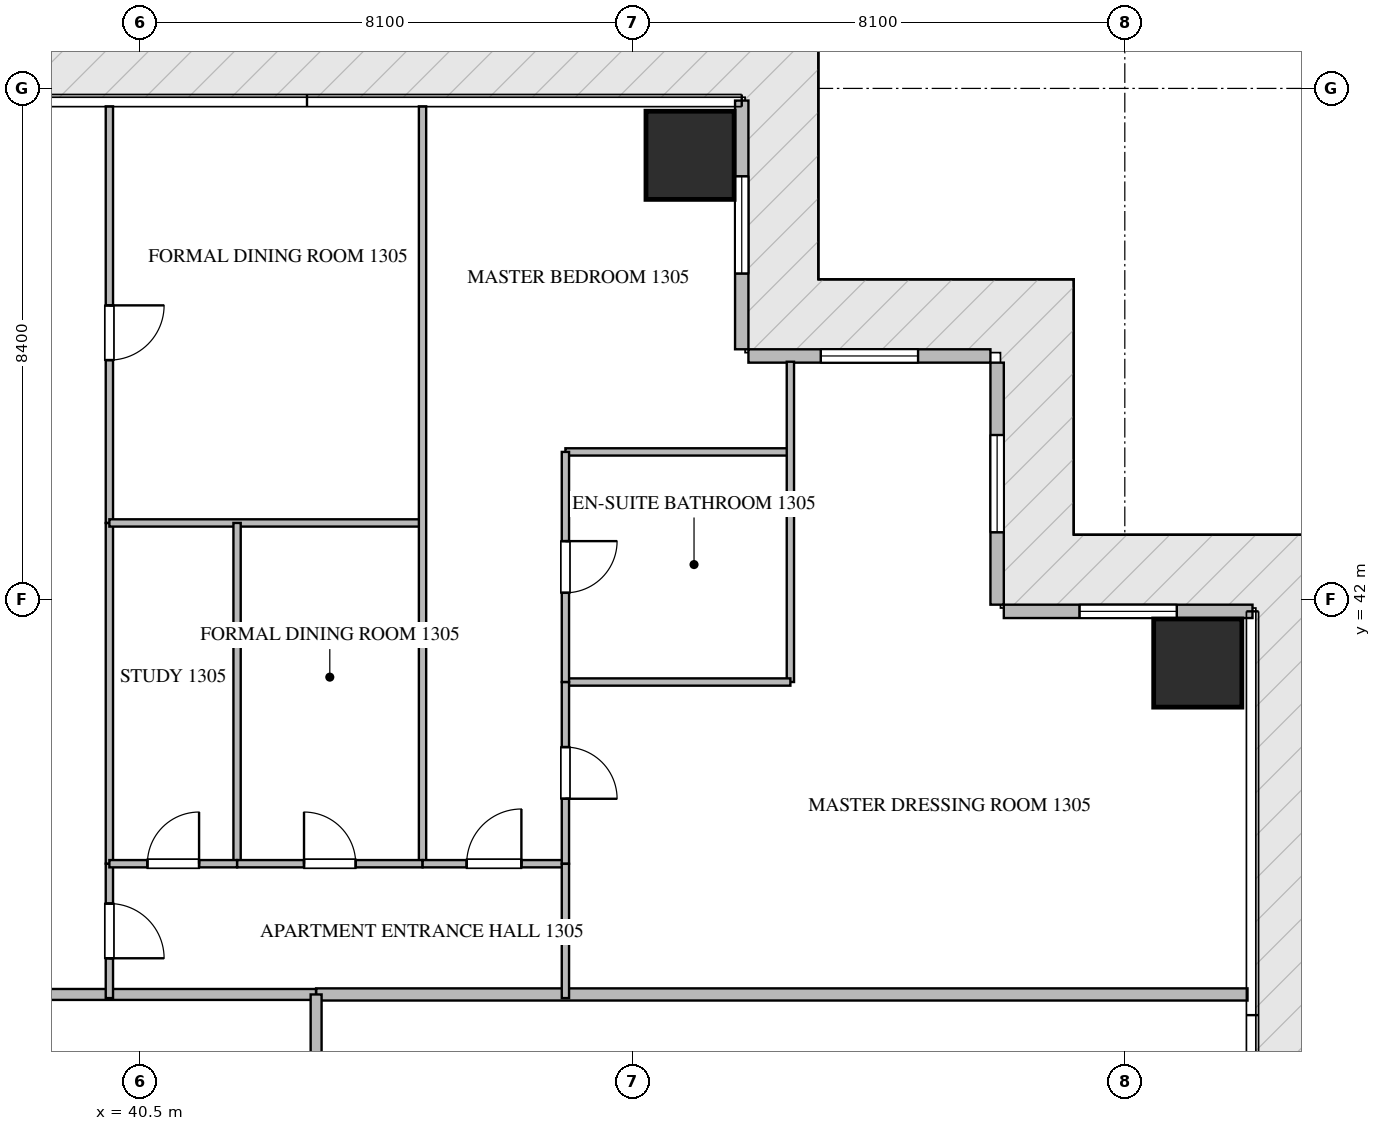
"""IFC4 building model, lengths in metres.
Left out: names, types, materials, properties, quantities, classifications, styles, units other than length and angle.
Written with IfcOpenShell. Run it as: python <this file> out.ifc"""

import sys

from ifc_helpers import new_model, si_unit, direction, frame, frame_2d, origin, origin_2d, place, context, subcontext, project, spatial, rectangle, extrude, source, transform, mapped, element, fill, save


model = new_model("IFC4")
c1 = context("Model", 3, precision=1e-05, world=origin(), true_north=direction((0.0, 1.0)))
c2 = subcontext(c1, "Body", "Model", "MODEL_VIEW")
j1 = project(units=[si_unit("LENGTHUNIT", "METRE"), si_unit("PLANEANGLEUNIT", "RADIAN")], contexts=[c1])
p1 = place(None, origin())
s1 = spatial("IfcSite", under=j1, at=p1, CompositionType="ELEMENT")
p2 = place(p1, origin())
s2 = spatial("IfcBuilding", under=s1, at=p2, CompositionType="ELEMENT")
p3 = place(p2, frame((0.0, 0.0, 56.7)))
s3 = spatial("IfcBuildingStorey", under=s2, at=p3, CompositionType="ELEMENT", Elevation=56.7)
m1 = source(origin(), c2, "Body", "SweptSolid", [
    extrude(rectangle(XDim=1.45, YDim=1.45, at=origin_2d()), origin(), (0.0, 0.0, 1.0), 3.75),
])
for number, where, z_axis, x_axis in (
    (1, (49.55, 49.3, -0.26), (0.0, 0.0, 1.0), (1.0, 0.0, 0.0)),
    (2, (57.9, 40.95, -0.26), (0.0, 0.0, 1.0), (1.0, 0.0, 0.0)),
):
    element("IfcColumn", number, at=place(p3, frame(where, z_axis=z_axis, x_axis=x_axis)), inside=s3, PredefinedType="COLUMN", context=c2, shape_type="MappedRepresentation", body=[
        mapped(m1, transform((0.0, 0.0, 0.0), scale=1.0)),
    ])
p4 = place(p3, frame((58.8, 41.8, 0.0), z_axis=(0.0, 0.0, 1.0), x_axis=(-1.0, 0.0, 0.0)))
e3 = element("IfcWall", 3, at=p4, inside=s3, PredefinedType="ELEMENTEDWALL", context=c2, shape_type="SweptSolid", body=[
    extrude(rectangle(XDim=4.09, YDim=0.22, at=frame_2d((2.045, 0.0))), origin(), (0.0, 0.0, 1.0), 3.475),
])
p5 = place(p4, frame((1.245, 0.0, 0.65)))
e4 = element("IfcOpeningElement", 4, at=p5, cuts=e3, PredefinedType="OPENING", context=c2, shape_type="SweptSolid", body=[
    extrude(rectangle(XDim=1.6, YDim=2.1, at=frame_2d((0.8, 1.05))), frame((0.0, 0.12, 0.0), z_axis=(0.0, -1.0, 0.0), x_axis=(1.0, 0.0, 0.0)), (0.0, 0.0, 1.0), 0.24),
])
p6 = place(p3, frame((54.6, 41.91, 0.0), z_axis=(0.0, 0.0, 1.0), x_axis=(0.0, 1.0, 0.0)))
e5 = element("IfcWall", 5, at=p6, inside=s3, PredefinedType="ELEMENTEDWALL", context=c2, shape_type="SweptSolid", body=[
    extrude(rectangle(XDim=3.98, YDim=0.22, at=frame_2d((1.99, 0.0))), origin(), (0.0, 0.0, 1.0), 3.475),
])
p7 = place(p6, frame((1.19, 0.0, 0.65)))
e6 = element("IfcOpeningElement", 6, at=p7, cuts=e5, PredefinedType="OPENING", context=c2, shape_type="SweptSolid", body=[
    extrude(rectangle(XDim=1.6, YDim=2.1, at=frame_2d((0.8, 1.05))), frame((0.0, 0.12, 0.0), z_axis=(0.0, -1.0, 0.0), x_axis=(1.0, 0.0, 0.0)), (0.0, 0.0, 1.0), 0.24),
])
p8 = place(p3, frame((54.49, 46.0, 0.0), z_axis=(0.0, 0.0, 1.0), x_axis=(-1.0, 0.0, 0.0)))
e7 = element("IfcWall", 7, at=p8, inside=s3, PredefinedType="ELEMENTEDWALL", context=c2, shape_type="SweptSolid", body=[
    extrude(rectangle(XDim=3.98, YDim=0.22, at=frame_2d((1.99, 0.0))), origin(), (0.0, 0.0, 1.0), 3.475),
])
p9 = place(p8, frame((1.19, 0.0, 0.65)))
e8 = element("IfcOpeningElement", 8, at=p9, cuts=e7, PredefinedType="OPENING", context=c2, shape_type="SweptSolid", body=[
    extrude(rectangle(XDim=1.6, YDim=2.1, at=frame_2d((0.8, 1.05))), frame((0.0, 0.12, 0.0), z_axis=(0.0, -1.0, 0.0), x_axis=(1.0, 0.0, 0.0)), (0.0, 0.0, 1.0), 0.24),
])
p10 = place(p3, frame((50.4, 46.11, 0.0), z_axis=(0.0, 0.0, 1.0), x_axis=(0.0, 1.0, 0.0)))
e9 = element("IfcWall", 9, at=p10, inside=s3, PredefinedType="ELEMENTEDWALL", context=c2, shape_type="SweptSolid", body=[
    extrude(rectangle(XDim=4.09, YDim=0.22, at=frame_2d((2.045, 0.0))), origin(), (0.0, 0.0, 1.0), 3.475),
])
p11 = place(p10, frame((1.245, 0.0, 0.65)))
e10 = element("IfcOpeningElement", 10, at=p11, cuts=e9, PredefinedType="OPENING", context=c2, shape_type="SweptSolid", body=[
    extrude(rectangle(XDim=1.6, YDim=2.1, at=frame_2d((0.8, 1.05))), frame((0.0, 0.12, 0.0), z_axis=(0.0, -1.0, 0.0), x_axis=(1.0, 0.0, 0.0)), (0.0, 0.0, 1.0), 0.24),
])
p12 = place(p3, frame((43.4, 35.5, 0.0), z_axis=(0.0, 0.0, 1.0), x_axis=(1.0, 0.0, 0.0)))
e11 = element("IfcWall", 11, at=p12, inside=s3, PredefinedType="PARTITIONING", context=c2, shape_type="SweptSolid", body=[
    extrude(rectangle(XDim=15.318, YDim=0.2, at=frame_2d((7.659, 0.0))), origin(), (0.0, 0.0, 1.0), 3.49),
])
p13 = place(p3, frame((21.402, 35.5, 0.0), z_axis=(0.0, 0.0, 1.0), x_axis=(1.0, 0.0, 0.0)))
e12 = element("IfcWall", 12, at=p13, inside=s3, PredefinedType="PARTITIONING", context=c2, shape_type="SweptSolid", body=[
    extrude(rectangle(XDim=21.996, YDim=0.18, at=frame_2d((10.998, 0.0))), origin(), (0.0, 0.0, 1.0), 3.49),
])
p14 = place(p13, frame((15.222, 0.0, 0.0)))
e13 = element("IfcOpeningElement", 13, at=p14, cuts=e12, PredefinedType="OPENING", context=c2, shape_type="SweptSolid", body=[
    extrude(rectangle(XDim=1.0, YDim=2.15, at=frame_2d((0.5, 1.075))), frame((0.0, 0.1, 0.0), z_axis=(0.0, -1.0, 0.0), x_axis=(1.0, 0.0, 0.0)), (0.0, 0.0, 1.0), 0.2),
])
p15 = place(p3, frame((43.4, 14.9, 0.0), z_axis=(0.0, 0.0, 1.0), x_axis=(0.0, 1.0, 0.0)))
e14 = element("IfcWall", 14, at=p15, inside=s3, PredefinedType="PARTITIONING", context=c2, shape_type="SweptSolid", body=[
    extrude(rectangle(XDim=20.6, YDim=0.18, at=frame_2d((10.3, 0.0))), origin(), (0.0, 0.0, 1.0), 3.49),
])
p16 = place(p15, frame((17.64, 0.0, 0.0)))
e15 = element("IfcOpeningElement", 15, at=p16, cuts=e14, PredefinedType="OPENING", context=c2, shape_type="SweptSolid", body=[
    extrude(rectangle(XDim=1.0, YDim=2.15, at=frame_2d((0.5, 1.075))), frame((0.0, 0.1, 0.0), z_axis=(0.0, -1.0, 0.0), x_axis=(1.0, 0.0, 0.0)), (0.0, 0.0, 1.0), 0.2),
])
p17 = place(p3, frame((40.0, 37.65, 0.0), z_axis=(0.0, 0.0, 1.0), x_axis=(0.0, -1.0, 0.0)))
e16 = element("IfcWall", 16, at=p17, inside=s3, PredefinedType="PARTITIONING", context=c2, shape_type="SweptSolid", body=[
    extrude(rectangle(XDim=2.21, YDim=0.12, at=frame_2d((1.105, 0.0))), origin(), (0.0, 0.0, 1.0), 3.49),
])
p18 = place(p17, frame((0.655, 0.0, 0.0)))
e17 = element("IfcOpeningElement", 17, at=p18, cuts=e16, PredefinedType="OPENING", context=c2, shape_type="SweptSolid", body=[
    extrude(rectangle(XDim=0.9, YDim=2.1, at=frame_2d((0.45, 1.05))), frame((0.0, 0.07, 0.0), z_axis=(0.0, -1.0, 0.0), x_axis=(1.0, 0.0, 0.0)), (0.0, 0.0, 1.0), 0.14),
])
p19 = place(p3, frame((40.0, 50.105, 0.0), z_axis=(0.0, 0.0, 1.0), x_axis=(0.0, -1.0, 0.0)))
e18 = element("IfcWall", 18, at=p19, inside=s3, PredefinedType="PARTITIONING", context=c2, shape_type="SweptSolid", body=[
    extrude(rectangle(XDim=6.851, YDim=0.12, at=frame_2d((3.426, 0.0))), origin(), (0.0, 0.0, 1.0), 3.49),
])
p20 = place(p19, frame((3.273, 0.0, 0.0)))
e19 = element("IfcOpeningElement", 19, at=p20, cuts=e18, PredefinedType="OPENING", context=c2, shape_type="SweptSolid", body=[
    extrude(rectangle(XDim=0.9, YDim=2.1, at=frame_2d((0.45, 1.05))), frame((0.0, 0.07, 0.0), z_axis=(0.0, -1.0, 0.0), x_axis=(1.0, 0.0, 0.0)), (0.0, 0.0, 1.0), 0.14),
])
p21 = place(p3, frame((40.0, 43.252, 0.0), z_axis=(0.0, 0.0, 1.0), x_axis=(0.0, -1.0, 0.0)))
e20 = element("IfcWall", 20, at=p21, inside=s3, PredefinedType="PARTITIONING", context=c2, shape_type="SweptSolid", body=[
    extrude(rectangle(XDim=5.6, YDim=0.12, at=frame_2d((2.8, 0.0))), origin(), (0.0, 0.0, 1.0), 3.49),
])
p22 = place(p3, frame((40.0, 43.254, 0.0), z_axis=(0.0, 0.0, 1.0), x_axis=(1.0, 0.0, 0.0)))
e21 = element("IfcWall", 21, at=p22, inside=s3, PredefinedType="PARTITIONING", context=c2, shape_type="SweptSolid", body=[
    extrude(rectangle(XDim=5.15, YDim=0.12, at=frame_2d((2.575, 0.0))), origin(), (0.0, 0.0, 1.0), 3.49),
])
p23 = place(p3, frame((45.15, 50.105, 0.0), z_axis=(0.0, 0.0, 1.0), x_axis=(0.0, -1.0, 0.0)))
e22 = element("IfcWall", 22, at=p23, inside=s3, PredefinedType="PARTITIONING", context=c2, shape_type="SweptSolid", body=[
    extrude(rectangle(XDim=12.455, YDim=0.12, at=frame_2d((6.228, 0.0))), origin(), (0.0, 0.0, 1.0), 3.49),
])
p24 = place(p3, frame((42.1, 43.254, 0.0), z_axis=(0.0, 0.0, 1.0), x_axis=(0.0, -1.0, 0.0)))
e23 = element("IfcWall", 23, at=p24, inside=s3, PredefinedType="PARTITIONING", context=c2, shape_type="SweptSolid", body=[
    extrude(rectangle(XDim=5.604, YDim=0.12, at=frame_2d((2.802, 0.0))), origin(), (0.0, 0.0, 1.0), 3.49),
])
p25 = place(p3, frame((40.0, 37.65, 0.0), z_axis=(0.0, 0.0, 1.0), x_axis=(1.0, 0.0, 0.0)))
e24 = element("IfcWall", 24, at=p25, inside=s3, PredefinedType="PARTITIONING", context=c2, shape_type="SweptSolid", body=[
    extrude(rectangle(XDim=2.1, YDim=0.12, at=frame_2d((1.05, 0.0))), origin(), (0.0, 0.0, 1.0), 3.49),
])
p26 = place(p25, frame((0.625, 0.0, 0.0)))
e25 = element("IfcOpeningElement", 25, at=p26, cuts=e24, PredefinedType="OPENING", context=c2, shape_type="SweptSolid", body=[
    extrude(rectangle(XDim=0.85, YDim=2.1, at=frame_2d((0.425, 1.05))), frame((0.0, 0.07, 0.0), z_axis=(0.0, -1.0, 0.0), x_axis=(1.0, 0.0, 0.0)), (0.0, 0.0, 1.0), 0.14),
])
p27 = place(p3, frame((42.102, 37.65, 0.0), z_axis=(0.0, 0.0, 1.0), x_axis=(1.0, 0.0, 0.0)))
e26 = element("IfcWall", 26, at=p27, inside=s3, PredefinedType="PARTITIONING", context=c2, shape_type="SweptSolid", body=[
    extrude(rectangle(XDim=3.048, YDim=0.12, at=frame_2d((1.524, 0.0))), origin(), (0.0, 0.0, 1.0), 3.49),
])
p28 = place(p27, frame((1.099, 0.0, 0.0)))
e27 = element("IfcOpeningElement", 27, at=p28, cuts=e26, PredefinedType="OPENING", context=c2, shape_type="SweptSolid", body=[
    extrude(rectangle(XDim=0.85, YDim=2.1, at=frame_2d((0.425, 1.05))), frame((0.0, 0.07, 0.0), z_axis=(0.0, -1.0, 0.0), x_axis=(1.0, 0.0, 0.0)), (0.0, 0.0, 1.0), 0.14),
])
p29 = place(p3, frame((45.152, 37.65, 0.0), z_axis=(0.0, 0.0, 1.0), x_axis=(1.0, 0.0, 0.0)))
e28 = element("IfcWall", 28, at=p29, inside=s3, PredefinedType="PARTITIONING", context=c2, shape_type="SweptSolid", body=[
    extrude(rectangle(XDim=2.348, YDim=0.12, at=frame_2d((1.174, 0.0))), origin(), (0.0, 0.0, 1.0), 3.49),
])
p30 = place(p29, frame((0.724, 0.0, 0.0)))
e29 = element("IfcOpeningElement", 29, at=p30, cuts=e28, PredefinedType="OPENING", context=c2, shape_type="SweptSolid", body=[
    extrude(rectangle(XDim=0.9, YDim=2.1, at=frame_2d((0.45, 1.05))), frame((0.0, 0.07, 0.0), z_axis=(0.0, -1.0, 0.0), x_axis=(1.0, 0.0, 0.0)), (0.0, 0.0, 1.0), 0.14),
])
p31 = place(p3, frame((47.5, 44.422, 0.0), z_axis=(0.0, 0.0, 1.0), x_axis=(1.0, 0.0, 0.0)))
e30 = element("IfcWall", 30, at=p31, inside=s3, PredefinedType="PARTITIONING", context=c2, shape_type="SweptSolid", body=[
    extrude(rectangle(XDim=3.7, YDim=0.12, at=frame_2d((1.85, 0.0))), origin(), (0.0, 0.0, 1.0), 3.49),
])
p32 = place(p3, frame((51.2, 45.905, 0.0), z_axis=(0.0, 0.0, 1.0), x_axis=(0.0, -1.0, 0.0)))
e31 = element("IfcWall", 31, at=p32, inside=s3, PredefinedType="PARTITIONING", context=c2, shape_type="SweptSolid", body=[
    extrude(rectangle(XDim=5.267, YDim=0.12, at=frame_2d((2.634, 0.0))), origin(), (0.0, 0.0, 1.0), 3.49),
])
p33 = place(p3, frame((47.5, 40.638, 0.0), z_axis=(0.0, 0.0, 1.0), x_axis=(1.0, 0.0, 0.0)))
e32 = element("IfcWall", 32, at=p33, inside=s3, PredefinedType="PARTITIONING", context=c2, shape_type="SweptSolid", body=[
    extrude(rectangle(XDim=3.7, YDim=0.12, at=frame_2d((1.85, 0.0))), origin(), (0.0, 0.0, 1.0), 3.49),
])
p34 = place(p3, frame((47.5, 44.422, 0.0), z_axis=(0.0, 0.0, 1.0), x_axis=(0.0, -1.0, 0.0)))
e33 = element("IfcWall", 33, at=p34, inside=s3, PredefinedType="PARTITIONING", context=c2, shape_type="SweptSolid", body=[
    extrude(rectangle(XDim=3.784, YDim=0.12, at=frame_2d((1.892, 0.0))), origin(), (0.0, 0.0, 1.0), 3.49),
])
p35 = place(p34, frame((1.467, 0.0, 0.0)))
e34 = element("IfcOpeningElement", 34, at=p35, cuts=e33, PredefinedType="OPENING", context=c2, shape_type="SweptSolid", body=[
    extrude(rectangle(XDim=0.85, YDim=2.1, at=frame_2d((0.425, 1.05))), frame((0.0, 0.07, 0.0), z_axis=(0.0, -1.0, 0.0), x_axis=(1.0, 0.0, 0.0)), (0.0, 0.0, 1.0), 0.14),
])
p36 = place(p3, frame((47.5, 40.636, 0.0), z_axis=(0.0, 0.0, 1.0), x_axis=(0.0, -1.0, 0.0)))
e35 = element("IfcWall", 35, at=p36, inside=s3, PredefinedType="PARTITIONING", context=c2, shape_type="SweptSolid", body=[
    extrude(rectangle(XDim=2.986, YDim=0.12, at=frame_2d((1.493, 0.0))), origin(), (0.0, 0.0, 1.0), 3.49),
])
p37 = place(p36, frame((1.068, 0.0, 0.0)))
e36 = element("IfcOpeningElement", 36, at=p37, cuts=e35, PredefinedType="OPENING", context=c2, shape_type="SweptSolid", body=[
    extrude(rectangle(XDim=0.85, YDim=2.1, at=frame_2d((0.425, 1.05))), frame((0.0, 0.07, 0.0), z_axis=(0.0, -1.0, 0.0), x_axis=(1.0, 0.0, 0.0)), (0.0, 0.0, 1.0), 0.14),
])
p38 = place(p3, frame((47.5, 37.648, 0.0), z_axis=(0.0, 0.0, 1.0), x_axis=(0.0, -1.0, 0.0)))
e37 = element("IfcWall", 37, at=p38, inside=s3, PredefinedType="PARTITIONING", context=c2, shape_type="SweptSolid", body=[
    extrude(rectangle(XDim=2.208, YDim=0.12, at=frame_2d((1.104, 0.0))), origin(), (0.0, 0.0, 1.0), 3.49),
])
m2 = source(origin(), c2, "Body", "SweptSolid", [
    extrude(rectangle(XDim=1.6, YDim=2.1, at=frame_2d((0.8, 1.05))), frame((0.0, 0.03, 0.0), z_axis=(0.0, -1.0, 0.0), x_axis=(1.0, 0.0, 0.0)), (0.0, 0.0, 1.0), 0.06),
])
p39 = place(p5, origin())
e38 = element("IfcWindow", 38, at=p39, inside=s3, PartitioningType="SINGLE_PANEL", PredefinedType="WINDOW", context=c2, shape_type="MappedRepresentation", body=[
    mapped(m2, transform((0.0, 0.0, 0.0), scale=1.0)),
])
fill(e4, e38)
p40 = place(p7, origin())
e39 = element("IfcWindow", 39, at=p40, inside=s3, PartitioningType="SINGLE_PANEL", PredefinedType="WINDOW", context=c2, shape_type="MappedRepresentation", body=[
    mapped(m2, transform((0.0, 0.0, 0.0), scale=1.0)),
])
fill(e6, e39)
p41 = place(p9, origin())
e40 = element("IfcWindow", 40, at=p41, inside=s3, PartitioningType="SINGLE_PANEL", PredefinedType="WINDOW", context=c2, shape_type="MappedRepresentation", body=[
    mapped(m2, transform((0.0, 0.0, 0.0), scale=1.0)),
])
fill(e8, e40)
p42 = place(p11, origin())
e41 = element("IfcWindow", 41, at=p42, inside=s3, PartitioningType="SINGLE_PANEL", PredefinedType="WINDOW", context=c2, shape_type="MappedRepresentation", body=[
    mapped(m2, transform((0.0, 0.0, 0.0), scale=1.0)),
])
fill(e10, e41)
m3 = source(origin(), c2, "Body", "SweptSolid", [
    extrude(rectangle(XDim=0.9, YDim=2.1, at=frame_2d((0.45, 1.05))), frame((0.0, 0.025, 0.0), z_axis=(0.0, -1.0, 0.0), x_axis=(1.0, 0.0, 0.0)), (0.0, 0.0, 1.0), 0.05),
])
p43 = place(p18, origin())
e42 = element("IfcDoor", 42, at=p43, inside=s3, OperationType="SINGLE_SWING_RIGHT", PredefinedType="DOOR", context=c2, shape_type="MappedRepresentation", body=[
    mapped(m3, transform((0.0, 0.0, 0.0), scale=1.0)),
])
fill(e17, e42)
p44 = place(p20, origin())
e43 = element("IfcDoor", 43, at=p44, inside=s3, OperationType="SINGLE_SWING_LEFT", PredefinedType="DOOR", context=c2, shape_type="MappedRepresentation", body=[
    mapped(m3, transform((0.0, 0.0, 0.0), scale=1.0)),
])
fill(e19, e43)
m4 = source(origin(), c2, "Body", "SweptSolid", [
    extrude(rectangle(XDim=0.85, YDim=2.1, at=frame_2d((0.425, 1.05))), frame((0.0, 0.025, 0.0), z_axis=(0.0, -1.0, 0.0), x_axis=(1.0, 0.0, 0.0)), (0.0, 0.0, 1.0), 0.05),
])
p45 = place(p26, origin())
e44 = element("IfcDoor", 44, at=p45, inside=s3, OperationType="SINGLE_SWING_RIGHT", PredefinedType="DOOR", context=c2, shape_type="MappedRepresentation", body=[
    mapped(m4, transform((0.0, 0.0, 0.0), scale=1.0)),
])
fill(e25, e44)
p46 = place(p28, origin())
e45 = element("IfcDoor", 45, at=p46, inside=s3, OperationType="SINGLE_SWING_LEFT", PredefinedType="DOOR", context=c2, shape_type="MappedRepresentation", body=[
    mapped(m4, transform((0.0, 0.0, 0.0), scale=1.0)),
])
fill(e27, e45)
p47 = place(p30, origin())
e46 = element("IfcDoor", 46, at=p47, inside=s3, OperationType="SINGLE_SWING_RIGHT", PredefinedType="DOOR", context=c2, shape_type="MappedRepresentation", body=[
    mapped(m3, transform((0.0, 0.0, 0.0), scale=1.0)),
])
fill(e29, e46)
p48 = place(p35, origin())
e47 = element("IfcDoor", 47, at=p48, inside=s3, OperationType="SINGLE_SWING_LEFT", PredefinedType="DOOR", context=c2, shape_type="MappedRepresentation", body=[
    mapped(m4, transform((0.0, 0.0, 0.0), scale=1.0)),
])
fill(e34, e47)
p49 = place(p37, origin())
e48 = element("IfcDoor", 48, at=p49, inside=s3, OperationType="SINGLE_SWING_RIGHT", PredefinedType="DOOR", context=c2, shape_type="MappedRepresentation", body=[
    mapped(m4, transform((0.0, 0.0, 0.0), scale=1.0)),
])
fill(e36, e48)
save(model, sys.argv[1])
